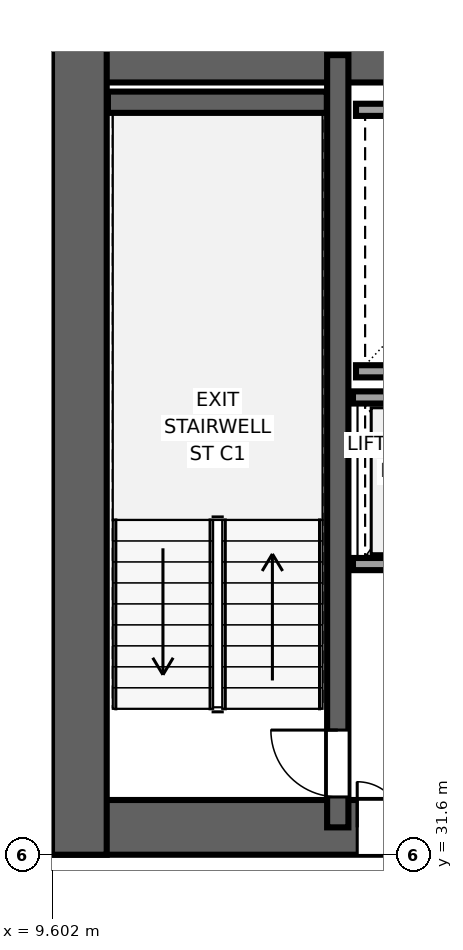
"""IFC4 building model, lengths in metres.
Left out: names, types, materials, properties, quantities, classifications, styles, units other than length and angle.
Written with IfcOpenShell. Run it as: python <this file> out.ifc"""

import sys

from ifc_helpers import new_model, si_unit, direction, frame, frame_2d, origin, place, context, subcontext, project, spatial, rectangle, extrude, source, transform, mapped, element, fill, save


model = new_model("IFC4")
c1 = context("Model", 3, precision=1e-05, world=origin(), true_north=direction((0.0, 1.0)))
c2 = subcontext(c1, "Body", "Model", "MODEL_VIEW")
j1 = project(units=[si_unit("LENGTHUNIT", "METRE"), si_unit("PLANEANGLEUNIT", "RADIAN")], contexts=[c1])
p1 = place(None, origin())
s1 = spatial("IfcSite", under=j1, at=p1, CompositionType="ELEMENT")
p2 = place(p1, origin())
s2 = spatial("IfcBuilding", under=s1, at=p2, CompositionType="ELEMENT")
p3 = place(p2, frame((0.0, 0.0, 60.4)))
s3 = spatial("IfcBuildingStorey", under=s2, at=p3, CompositionType="ELEMENT", Elevation=60.4)
p4 = place(p3, frame((9.6, 32.05, 0.0), z_axis=(0.0, 0.0, 1.0), x_axis=(1.0, 0.0, 0.0)))
e1 = element("IfcWall", 1, at=p4, inside=s3, PredefinedType="SHEAR", context=c2, shape_type="SweptSolid", body=[
    extrude(rectangle(XDim=26.8, YDim=0.9, at=frame_2d((13.4, 0.0))), origin(), (0.0, 0.0, 1.0), 3.55),
])
p5 = place(p4, frame((6.52, 0.0, 0.0), z_axis=(0.0, 0.0, 1.0), x_axis=(-1.0, 0.0, 0.0)))
e2 = element("IfcOpeningElement", 2, at=p5, cuts=e1, PredefinedType="OPENING", context=c2, shape_type="SweptSolid", body=[
    extrude(rectangle(XDim=1.5, YDim=2.04, at=frame_2d((0.75, 1.02))), frame((0.0, 0.46, 0.0), z_axis=(0.0, -1.0, 0.0), x_axis=(1.0, 0.0, 0.0)), (0.0, 0.0, 1.0), 0.92),
])
p6 = place(p4, frame((14.15, 0.0, 0.0), z_axis=(0.0, 0.0, 1.0), x_axis=(-1.0, 0.0, 0.0)))
e3 = element("IfcOpeningElement", 3, at=p6, cuts=e1, PredefinedType="OPENING", context=c2, shape_type="SweptSolid", body=[
    extrude(rectangle(XDim=1.5, YDim=2.04, at=frame_2d((0.75, 1.02))), frame((0.0, 0.46, 0.0), z_axis=(0.0, -1.0, 0.0), x_axis=(1.0, 0.0, 0.0)), (0.0, 0.0, 1.0), 0.92),
])
p7 = place(p4, frame((21.78, 0.0, 0.0), z_axis=(0.0, 0.0, 1.0), x_axis=(-1.0, 0.0, 0.0)))
e4 = element("IfcOpeningElement", 4, at=p7, cuts=e1, PredefinedType="OPENING", context=c2, shape_type="SweptSolid", body=[
    extrude(rectangle(XDim=1.5, YDim=2.04, at=frame_2d((0.75, 1.02))), frame((0.0, 0.46, 0.0), z_axis=(0.0, -1.0, 0.0), x_axis=(1.0, 0.0, 0.0)), (0.0, 0.0, 1.0), 0.92),
])
p8 = place(p4, frame((8.57, 0.0, 0.0), z_axis=(0.0, 0.0, 1.0), x_axis=(-1.0, 0.0, 0.0)))
e5 = element("IfcOpeningElement", 5, at=p8, cuts=e1, PredefinedType="OPENING", context=c2, shape_type="SweptSolid", body=[
    extrude(rectangle(XDim=0.82, YDim=2.01, at=frame_2d((0.41, 1.005))), frame((0.0, 0.46, 0.0), z_axis=(0.0, -1.0, 0.0), x_axis=(1.0, 0.0, 0.0)), (0.0, 0.0, 1.0), 0.92),
])
p9 = place(p4, frame((19.07, 0.0, 0.0), z_axis=(0.0, 0.0, 1.0), x_axis=(-1.0, 0.0, 0.0)))
e6 = element("IfcOpeningElement", 6, at=p9, cuts=e1, PredefinedType="OPENING", context=c2, shape_type="SweptSolid", body=[
    extrude(rectangle(XDim=0.82, YDim=2.01, at=frame_2d((0.41, 1.005))), frame((0.0, 0.46, 0.0), z_axis=(0.0, -1.0, 0.0), x_axis=(1.0, 0.0, 0.0)), (0.0, 0.0, 1.0), 0.92),
])
p10 = place(p3, frame((9.6, 44.75, 0.0), z_axis=(0.0, 0.0, 1.0), x_axis=(1.0, 0.0, 0.0)))
e7 = element("IfcWall", 7, at=p10, inside=s3, PredefinedType="SHEAR", context=c2, shape_type="SweptSolid", body=[
    extrude(rectangle(XDim=26.8, YDim=0.9, at=frame_2d((13.4, 0.0))), origin(), (0.0, 0.0, 1.0), 3.55),
])
p11 = place(p3, frame((10.05, 31.6, 0.0), z_axis=(0.0, 0.0, 1.0), x_axis=(0.0, 1.0, 0.0)))
e8 = element("IfcWall", 8, at=p11, inside=s3, PredefinedType="SHEAR", context=c2, shape_type="SweptSolid", body=[
    extrude(rectangle(XDim=13.6, YDim=0.9, at=frame_2d((6.8, 0.0))), origin(), (0.0, 0.0, 1.0), 3.55),
])
p12 = place(p3, frame((14.3, 32.05, 0.0), z_axis=(0.0, 0.0, 1.0), x_axis=(0.0, 1.0, 0.0)))
e9 = element("IfcWall", 9, at=p12, inside=s3, PredefinedType="SHEAR", context=c2, shape_type="SweptSolid", body=[
    extrude(rectangle(XDim=12.7, YDim=0.35, at=frame_2d((6.35, 0.0))), origin(), (0.0, 0.0, 1.0), 3.55),
])
p13 = place(p12, frame((0.5, 0.0, 0.0)))
e10 = element("IfcOpeningElement", 10, at=p13, cuts=e9, PredefinedType="OPENING", context=c2, shape_type="SweptSolid", body=[
    extrude(rectangle(XDim=1.1, YDim=2.12, at=frame_2d((0.55, 1.06))), frame((0.0, 0.185, 0.0), z_axis=(0.0, -1.0, 0.0), x_axis=(1.0, 0.0, 0.0)), (0.0, 0.0, 1.0), 0.37),
])
p14 = place(p3, frame((10.52, 43.975, 0.0), z_axis=(0.0, 0.0, 1.0), x_axis=(1.0, 0.0, 0.0)))
e11 = element("IfcWall", 11, at=p14, inside=s3, PredefinedType="SHEAR", context=c2, shape_type="SweptSolid", body=[
    extrude(rectangle(XDim=3.6, YDim=0.35, at=frame_2d((1.8, 0.0))), origin(), (0.0, 0.0, 1.0), 3.55),
])
for number, where, z_axis, x_axis in (
    (12, (14.6, 39.55, 0.0), (0.0, 0.0, 1.0), (1.0, 0.0, 0.0)),
    (13, (14.6, 43.85, 0.0), (0.0, 0.0, 1.0), (1.0, 0.0, 0.0)),
):
    element("IfcWall", number, at=place(p3, frame(where, z_axis=z_axis, x_axis=x_axis)), inside=s3, PredefinedType="SOLIDWALL", context=c2, shape_type="SweptSolid", body=[
        extrude(rectangle(XDim=4.1, YDim=0.2, at=frame_2d((2.05, 0.0))), origin(), (0.0, 0.0, 1.0), 3.37),
    ])
p15 = place(p3, frame((14.55, 36.38, 0.0), z_axis=(0.0, 0.0, 1.0), x_axis=(1.0, 0.0, 0.0)))
e14 = element("IfcWall", 14, at=p15, inside=s3, PredefinedType="SOLIDWALL", context=c2, shape_type="SweptSolid", body=[
    extrude(rectangle(XDim=4.075, YDim=0.2, at=frame_2d((2.038, 0.0))), origin(), (0.0, 0.0, 1.0), 3.37),
])
p16 = place(p15, frame((0.55, 0.0, 0.0)))
e15 = element("IfcOpeningElement", 15, at=p16, cuts=e14, PredefinedType="OPENING", context=c2, shape_type="SweptSolid", body=[
    extrude(rectangle(XDim=1.1, YDim=2.12, at=frame_2d((0.55, 1.06))), frame((0.0, 0.11, 0.0), z_axis=(0.0, -1.0, 0.0), x_axis=(1.0, 0.0, 0.0)), (0.0, 0.0, 1.0), 0.22),
])
p17 = place(p15, frame((2.45, 0.0, 0.0)))
e16 = element("IfcOpeningElement", 16, at=p17, cuts=e14, PredefinedType="OPENING", context=c2, shape_type="SweptSolid", body=[
    extrude(rectangle(XDim=1.1, YDim=2.12, at=frame_2d((0.55, 1.06))), frame((0.0, 0.11, 0.0), z_axis=(0.0, -1.0, 0.0), x_axis=(1.0, 0.0, 0.0)), (0.0, 0.0, 1.0), 0.22),
])
p18 = place(p3, frame((14.55, 39.12, 0.0), z_axis=(0.0, 0.0, 1.0), x_axis=(1.0, 0.0, 0.0)))
e17 = element("IfcWall", 17, at=p18, inside=s3, PredefinedType="SOLIDWALL", context=c2, shape_type="SweptSolid", body=[
    extrude(rectangle(XDim=4.075, YDim=0.2, at=frame_2d((2.038, 0.0))), origin(), (0.0, 0.0, 1.0), 3.37),
])
m1 = source(origin(), c2, "Body", "SweptSolid", [
    extrude(rectangle(XDim=1.1, YDim=2.12, at=frame_2d((0.55, 1.06))), frame((0.0, 0.025, 0.0), z_axis=(0.0, -1.0, 0.0), x_axis=(1.0, 0.0, 0.0)), (0.0, 0.0, 1.0), 0.05),
])
p19 = place(p13, origin())
e18 = element("IfcDoor", 18, at=p19, inside=s3, OperationType="SINGLE_SWING_RIGHT", PredefinedType="DOOR", context=c2, shape_type="MappedRepresentation", body=[
    mapped(m1, transform((0.0, 0.0, 0.0), x_axis=(1.0, 0.0, 0.0), y_axis=(0.0, 1.0, 0.0), z_axis=(0.0, 0.0, 1.0), scale=1.0)),
])
fill(e10, e18)
m2 = source(origin(), c2, "Body", "SweptSolid", [
    extrude(rectangle(XDim=1.5, YDim=2.04, at=frame_2d((0.75, 1.02))), frame((0.0, 0.025, 0.0), z_axis=(0.0, -1.0, 0.0), x_axis=(1.0, 0.0, 0.0)), (0.0, 0.0, 1.0), 0.05),
])
p20 = place(p5, origin())
e19 = element("IfcDoor", 19, at=p20, inside=s3, OperationType="DOUBLE_DOOR_SINGLE_SWING", PredefinedType="DOOR", context=c2, shape_type="MappedRepresentation", body=[
    mapped(m2, transform((0.0, 0.0, 0.0), x_axis=(1.0, 0.0, 0.0), y_axis=(0.0, 1.0, 0.0), z_axis=(0.0, 0.0, 1.0), scale=1.0)),
])
fill(e2, e19)
save(model, sys.argv[1])
